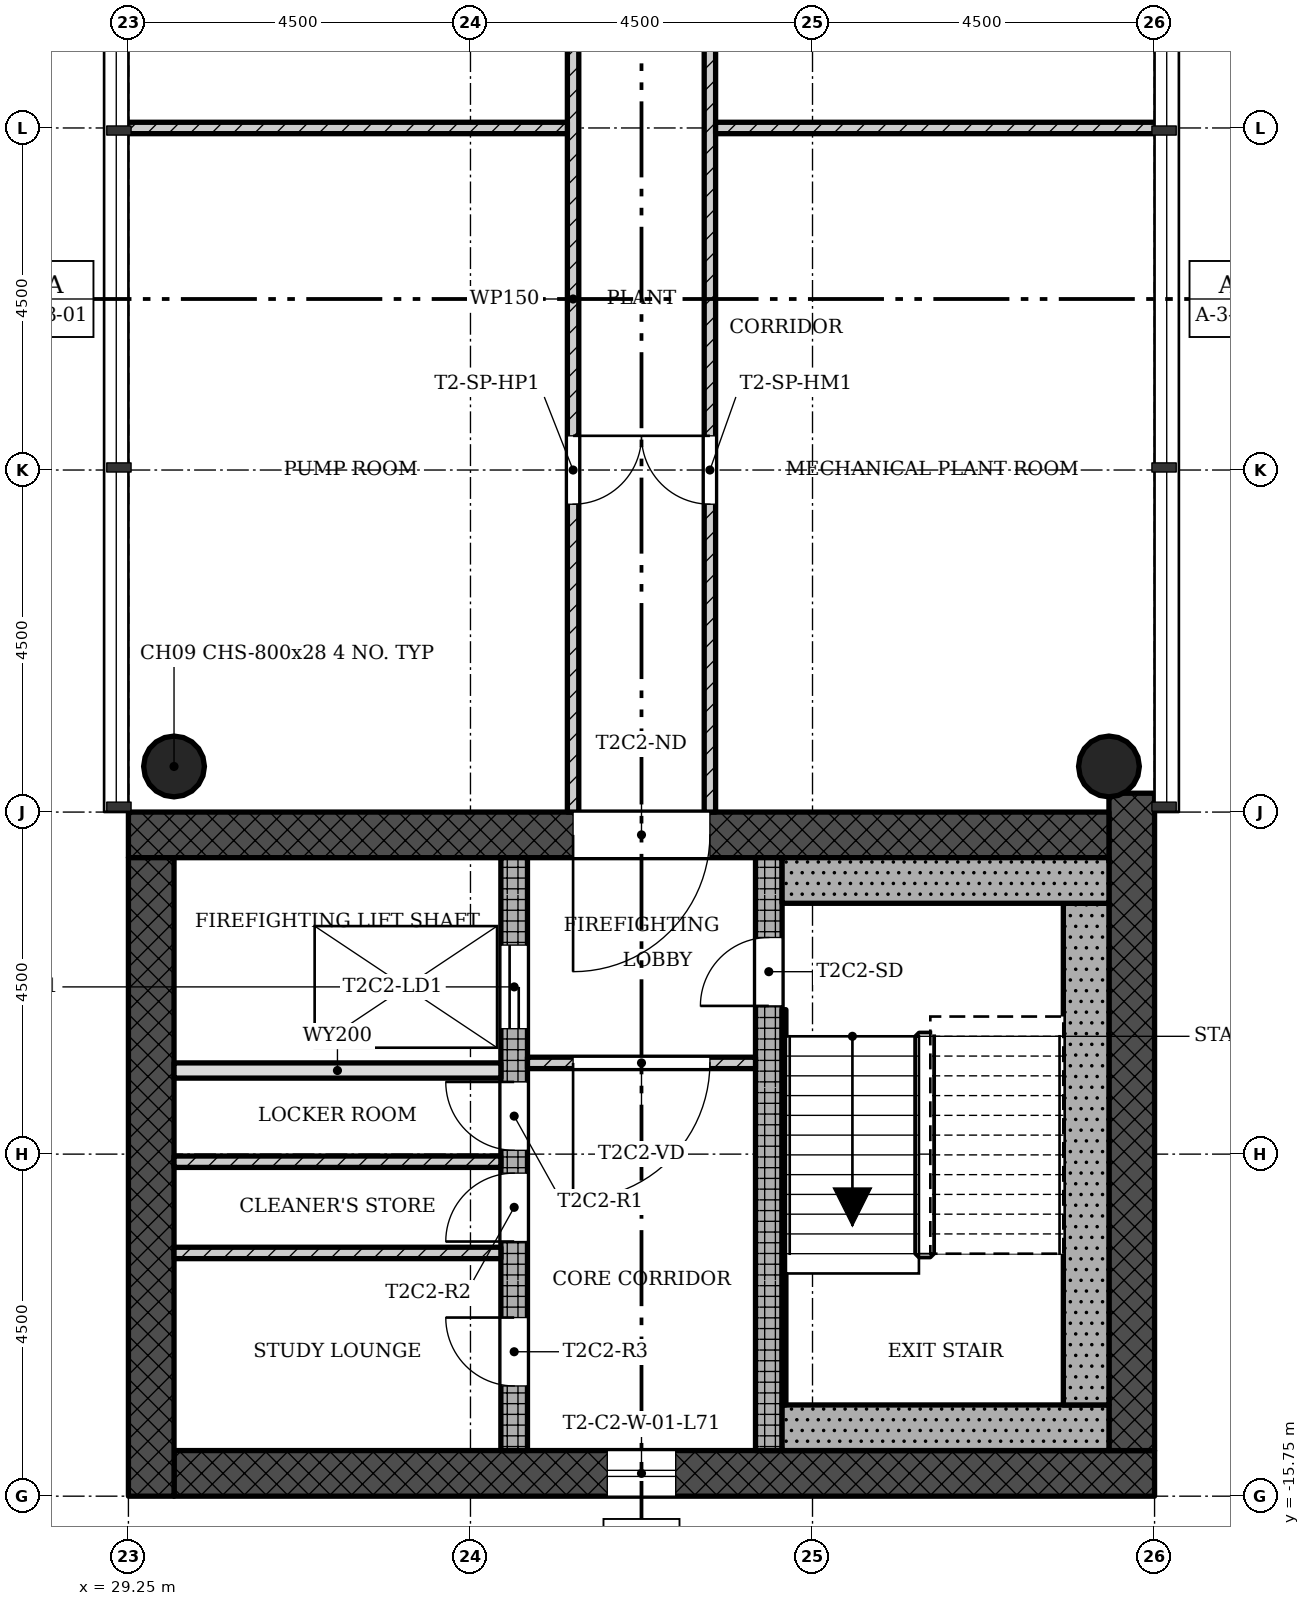
"""IFC4 building model, lengths in metres.
Left out: names, types, materials, properties, quantities, classifications, styles, units other than length and angle.
Written with IfcOpenShell. Run it as: python <this file> out.ifc"""

import sys

from ifc_helpers import new_model, si_unit, direction, frame, frame_2d, origin, origin_2d, place, context, subcontext, project, spatial, rectangle, hollow_circle, extrude, element, fill, save


model = new_model("IFC4")
c1 = context("Model", 3, precision=1e-05, world=origin(), true_north=direction((0.0, 1.0)))
c2 = subcontext(c1, "Body", "Model", "MODEL_VIEW")
j1 = project(units=[si_unit("LENGTHUNIT", "METRE"), si_unit("PLANEANGLEUNIT", "RADIAN")], contexts=[c1])
p1 = place(None, origin())
s1 = spatial("IfcSite", under=j1, at=p1, CompositionType="ELEMENT")
p2 = place(p1, origin())
s2 = spatial("IfcBuilding", under=s1, at=p2, CompositionType="ELEMENT")
p3 = place(p2, frame((0.0, 0.0, 260.4)))
s3 = spatial("IfcBuildingStorey", under=s2, at=p3, CompositionType="ELEMENT", Elevation=260.4)
p4 = place(p3, frame((29.85, -15.45, 0.0), z_axis=(0.0, 0.0, 1.0), x_axis=(1.0, 0.0, 0.0)))
e1 = element("IfcWall", 1, at=p4, inside=s3, PredefinedType="SHEAR", context=c2, shape_type="SweptSolid", body=[
    extrude(rectangle(XDim=12.9, YDim=0.6, at=frame_2d((6.45, 0.0))), origin(), (0.0, 0.0, 1.0), 4.5),
])
p5 = place(p4, frame((5.7, 0.0, 0.45)))
e2 = element("IfcOpeningElement", 2, at=p5, cuts=e1, PredefinedType="OPENING", context=c2, shape_type="SweptSolid", body=[
    extrude(rectangle(XDim=0.9, YDim=2.4, at=frame_2d((0.45, 1.2))), frame((0.0, 0.31, 0.0), z_axis=(0.0, -1.0, 0.0), x_axis=(1.0, 0.0, 0.0)), (0.0, 0.0, 1.0), 0.62),
])
p6 = place(p3, frame((42.45, -15.15, 0.0), z_axis=(0.0, 0.0, 1.0), x_axis=(0.0, 1.0, 0.0)))
e3 = element("IfcWall", 3, at=p6, inside=s3, PredefinedType="SHEAR", context=c2, shape_type="SweptSolid", body=[
    extrude(rectangle(XDim=8.648, YDim=0.6, at=frame_2d((4.324, 0.0))), origin(), (0.0, 0.0, 1.0), 4.5),
])
p7 = place(p3, frame((42.15, -7.05, 0.0), z_axis=(0.0, 0.0, 1.0), x_axis=(-1.0, 0.0, 0.0)))
e4 = element("IfcWall", 4, at=p7, inside=s3, PredefinedType="SHEAR", context=c2, shape_type="SweptSolid", body=[
    extrude(rectangle(XDim=12.9, YDim=0.6, at=frame_2d((6.45, 0.0))), origin(), (0.0, 0.0, 1.0), 4.5),
])
p8 = place(p7, frame((5.25, 0.0, 0.0)))
e5 = element("IfcOpeningElement", 5, at=p8, cuts=e4, PredefinedType="OPENING", context=c2, shape_type="SweptSolid", body=[
    extrude(rectangle(XDim=1.8, YDim=2.1, at=frame_2d((0.9, 1.05))), frame((0.0, 0.31, 0.0), z_axis=(0.0, -1.0, 0.0), x_axis=(1.0, 0.0, 0.0)), (0.0, 0.0, 1.0), 0.62),
])
p9 = place(p3, frame((29.55, -7.35, 0.0), z_axis=(0.0, 0.0, 1.0), x_axis=(0.0, -1.0, 0.0)))
e6 = element("IfcWall", 6, at=p9, inside=s3, PredefinedType="SHEAR", context=c2, shape_type="SweptSolid", body=[
    extrude(rectangle(XDim=8.4, YDim=0.6, at=frame_2d((4.2, 0.0))), origin(), (0.0, 0.0, 1.0), 4.5),
])
p10 = place(p3, frame((34.325, -15.15, 0.0), z_axis=(0.0, 0.0, 1.0), x_axis=(0.0, 1.0, 0.0)))
e7 = element("IfcWall", 7, at=p10, inside=s3, PredefinedType="SHEAR", context=c2, shape_type="SweptSolid", body=[
    extrude(rectangle(XDim=7.8, YDim=0.35, at=frame_2d((3.9, 0.0))), origin(), (0.0, 0.0, 1.0), 4.5),
])
p11 = place(p10, frame((5.55, 0.0, 0.0)))
e8 = element("IfcOpeningElement", 8, at=p11, cuts=e7, PredefinedType="OPENING", context=c2, shape_type="SweptSolid", body=[
    extrude(rectangle(XDim=1.1, YDim=2.1, at=frame_2d((0.55, 1.05))), frame((0.0, 0.185, 0.0), z_axis=(0.0, -1.0, 0.0), x_axis=(1.0, 0.0, 0.0)), (0.0, 0.0, 1.0), 0.37),
])
p12 = place(p10, frame((3.95, 0.0, 0.0)))
e9 = element("IfcOpeningElement", 9, at=p12, cuts=e7, PredefinedType="OPENING", context=c2, shape_type="SweptSolid", body=[
    extrude(rectangle(XDim=0.9, YDim=2.1, at=frame_2d((0.45, 1.05))), frame((0.0, 0.185, 0.0), z_axis=(0.0, -1.0, 0.0), x_axis=(1.0, 0.0, 0.0)), (0.0, 0.0, 1.0), 0.37),
])
p13 = place(p10, frame((2.75, 0.0, 0.0)))
e10 = element("IfcOpeningElement", 10, at=p13, cuts=e7, PredefinedType="OPENING", context=c2, shape_type="SweptSolid", body=[
    extrude(rectangle(XDim=0.9, YDim=2.1, at=frame_2d((0.45, 1.05))), frame((0.0, 0.185, 0.0), z_axis=(0.0, -1.0, 0.0), x_axis=(1.0, 0.0, 0.0)), (0.0, 0.0, 1.0), 0.37),
])
p14 = place(p10, frame((0.85, 0.0, 0.0)))
e11 = element("IfcOpeningElement", 11, at=p14, cuts=e7, PredefinedType="OPENING", context=c2, shape_type="SweptSolid", body=[
    extrude(rectangle(XDim=0.9, YDim=2.1, at=frame_2d((0.45, 1.05))), frame((0.0, 0.185, 0.0), z_axis=(0.0, -1.0, 0.0), x_axis=(1.0, 0.0, 0.0)), (0.0, 0.0, 1.0), 0.37),
])
p15 = place(p3, frame((37.675, -15.15, 0.0), z_axis=(0.0, 0.0, 1.0), x_axis=(0.0, 1.0, 0.0)))
e12 = element("IfcWall", 12, at=p15, inside=s3, PredefinedType="SHEAR", context=c2, shape_type="SweptSolid", body=[
    extrude(rectangle(XDim=7.8, YDim=0.35, at=frame_2d((3.9, 0.0))), origin(), (0.0, 0.0, 1.0), 4.5),
])
p16 = place(p15, frame((5.85, 0.0, 0.0)))
e13 = element("IfcOpeningElement", 13, at=p16, cuts=e12, PredefinedType="OPENING", context=c2, shape_type="SweptSolid", body=[
    extrude(rectangle(XDim=0.9, YDim=2.1, at=frame_2d((0.45, 1.05))), frame((0.0, 0.185, 0.0), z_axis=(0.0, -1.0, 0.0), x_axis=(1.0, 0.0, 0.0)), (0.0, 0.0, 1.0), 0.37),
])
for number, where, z_axis, x_axis in (
    (14, (42.15, -6.15, 0.0), (0.0, 0.0, 1.0), (1.0, 0.0, 0.0)),
    (15, (29.85, -6.15, 0.0), (0.0, 0.0, 1.0), (1.0, 0.0, 0.0)),
):
    element("IfcColumn", number, at=place(p3, frame(where, z_axis=z_axis, x_axis=x_axis)), inside=s3, PredefinedType="COLUMN", context=c2, shape_type="SweptSolid", body=[
        extrude(hollow_circle(Radius=0.4, WallThickness=0.028, at=origin_2d()), origin(), (0.0, 0.0, 1.0), 4.5),
    ])
p17 = place(p3, frame((34.5, -10.05, 0.0), z_axis=(0.0, 0.0, 1.0), x_axis=(1.0, 0.0, 0.0)))
e16 = element("IfcWall", 16, at=p17, inside=s3, PredefinedType="PARTITIONING", context=c2, shape_type="SweptSolid", body=[
    extrude(rectangle(XDim=3.0, YDim=0.15, at=frame_2d((1.5, 0.0))), origin(), (0.0, 0.0, 1.0), 4.09),
])
p18 = place(p17, frame((0.6, 0.0, 0.0)))
e17 = element("IfcOpeningElement", 17, at=p18, cuts=e16, PredefinedType="OPENING", context=c2, shape_type="SweptSolid", body=[
    extrude(rectangle(XDim=1.8, YDim=2.1, at=frame_2d((0.9, 1.05))), frame((0.0, 0.085, 0.0), z_axis=(0.0, -1.0, 0.0), x_axis=(1.0, 0.0, 0.0)), (0.0, 0.0, 1.0), 0.17),
])
p19 = place(p3, frame((29.85, -10.15, 0.0), z_axis=(0.0, 0.0, 1.0), x_axis=(1.0, 0.0, 0.0)))
e18 = element("IfcWall", 18, at=p19, inside=s3, PredefinedType="SOLIDWALL", context=c2, shape_type="SweptSolid", body=[
    extrude(rectangle(XDim=4.3, YDim=0.2, at=frame_2d((2.15, 0.0))), origin(), (0.0, 0.0, 1.0), 4.09),
])
for number, where, z_axis, x_axis in (
    (19, (29.85, -11.35, 0.0), (0.0, 0.0, 1.0), (1.0, 0.0, 0.0)),
    (20, (29.85, -12.55, 0.0), (0.0, 0.0, 1.0), (1.0, 0.0, 0.0)),
):
    element("IfcWall", number, at=place(p3, frame(where, z_axis=z_axis, x_axis=x_axis)), inside=s3, PredefinedType="PARTITIONING", context=c2, shape_type="SweptSolid", body=[
        extrude(rectangle(XDim=4.3, YDim=0.15, at=frame_2d((2.15, 0.0))), origin(), (0.0, 0.0, 1.0), 4.09),
    ])
p20 = place(p3, frame((35.1, -6.75, 0.0), z_axis=(0.0, 0.0, 1.0), x_axis=(0.0, 1.0, 0.0)))
e21 = element("IfcWall", 21, at=p20, inside=s3, PredefinedType="PARTITIONING", context=c2, shape_type="SweptSolid", body=[
    extrude(rectangle(XDim=13.5, YDim=0.15, at=frame_2d((6.75, 0.0))), origin(), (0.0, 0.0, 1.0), 4.09),
])
p21 = place(p20, frame((4.05, 0.0, 0.0)))
e22 = element("IfcOpeningElement", 22, at=p21, cuts=e21, PredefinedType="OPENING", context=c2, shape_type="SweptSolid", body=[
    extrude(rectangle(XDim=0.9, YDim=2.1, at=frame_2d((0.45, 1.05))), frame((0.0, 0.085, 0.0), z_axis=(0.0, -1.0, 0.0), x_axis=(1.0, 0.0, 0.0)), (0.0, 0.0, 1.0), 0.17),
])
p22 = place(p20, frame((10.8, 0.0, 0.0)))
e23 = element("IfcOpeningElement", 23, at=p22, cuts=e21, PredefinedType="OPENING", context=c2, shape_type="SweptSolid", body=[
    extrude(rectangle(XDim=0.9, YDim=2.1, at=frame_2d((0.45, 1.05))), frame((0.0, 0.085, 0.0), z_axis=(0.0, -1.0, 0.0), x_axis=(1.0, 0.0, 0.0)), (0.0, 0.0, 1.0), 0.17),
])
p23 = place(p3, frame((35.025, 2.25, 0.0), z_axis=(0.0, 0.0, 1.0), x_axis=(-1.0, 0.0, 0.0)))
e24 = element("IfcWall", 24, at=p23, inside=s3, PredefinedType="PARTITIONING", context=c2, shape_type="SweptSolid", body=[
    extrude(rectangle(XDim=5.875, YDim=0.15, at=frame_2d((2.938, 0.0))), origin(), (0.0, 0.0, 1.0), 4.09),
])
p24 = place(p3, frame((36.9, -6.75, 0.0), z_axis=(0.0, 0.0, 1.0), x_axis=(0.0, 1.0, 0.0)))
e25 = element("IfcWall", 25, at=p24, inside=s3, PredefinedType="PARTITIONING", context=c2, shape_type="SweptSolid", body=[
    extrude(rectangle(XDim=13.5, YDim=0.15, at=frame_2d((6.75, 0.0))), origin(), (0.0, 0.0, 1.0), 4.09),
])
p25 = place(p24, frame((4.05, 0.0, 0.0)))
e26 = element("IfcOpeningElement", 26, at=p25, cuts=e25, PredefinedType="OPENING", context=c2, shape_type="SweptSolid", body=[
    extrude(rectangle(XDim=0.9, YDim=2.1, at=frame_2d((0.45, 1.05))), frame((0.0, 0.085, 0.0), z_axis=(0.0, -1.0, 0.0), x_axis=(1.0, 0.0, 0.0)), (0.0, 0.0, 1.0), 0.17),
])
p26 = place(p24, frame((10.8, 0.0, 0.0)))
e27 = element("IfcOpeningElement", 27, at=p26, cuts=e25, PredefinedType="OPENING", context=c2, shape_type="SweptSolid", body=[
    extrude(rectangle(XDim=0.9, YDim=2.1, at=frame_2d((0.45, 1.05))), frame((0.0, 0.085, 0.0), z_axis=(0.0, -1.0, 0.0), x_axis=(1.0, 0.0, 0.0)), (0.0, 0.0, 1.0), 0.17),
])
p27 = place(p3, frame((36.975, 2.25, 0.0), z_axis=(0.0, 0.0, 1.0), x_axis=(1.0, 0.0, 0.0)))
e28 = element("IfcWall", 28, at=p27, inside=s3, PredefinedType="PARTITIONING", context=c2, shape_type="SweptSolid", body=[
    extrude(rectangle(XDim=5.875, YDim=0.15, at=frame_2d((2.938, 0.0))), origin(), (0.0, 0.0, 1.0), 4.09),
])
p28 = place(p3, frame((37.85, -14.85, 0.0), z_axis=(0.0, 0.0, 1.0), x_axis=(1.0, 0.0, 0.0)))
e29 = element("IfcWall", 29, at=p28, inside=s3, PredefinedType="SHEAR", context=c2, shape_type="SweptSolid", body=[
    extrude(rectangle(XDim=4.3, YDim=0.6, at=frame_2d((2.15, 0.0))), origin(), (0.0, 0.0, 1.0), 4.5),
])
p29 = place(p3, frame((41.85, -7.95, 0.0), z_axis=(0.0, 0.0, 1.0), x_axis=(0.0, -1.0, 0.0)))
e30 = element("IfcWall", 30, at=p29, inside=s3, PredefinedType="SHEAR", context=c2, shape_type="SweptSolid", body=[
    extrude(rectangle(XDim=6.6, YDim=0.6, at=frame_2d((3.3, 0.0))), origin(), (0.0, 0.0, 1.0), 4.5),
])
p30 = place(p3, frame((37.85, -7.65, 0.0), z_axis=(0.0, 0.0, 1.0), x_axis=(1.0, 0.0, 0.0)))
e31 = element("IfcWall", 31, at=p30, inside=s3, PredefinedType="SHEAR", context=c2, shape_type="SweptSolid", body=[
    extrude(rectangle(XDim=4.3, YDim=0.6, at=frame_2d((2.15, 0.0))), origin(), (0.0, 0.0, 1.0), 4.5),
])
p31 = place(p3, frame((37.875, -9.35, 0.0), z_axis=(0.0, 0.0, 1.0), x_axis=(0.0, -1.0, 0.0)))
e32 = element("IfcWall", 32, at=p31, inside=s3, PredefinedType="SHEAR", context=c2, shape_type="SweptSolid", body=[
    extrude(rectangle(XDim=5.2, YDim=0.05, at=frame_2d((2.6, 0.0))), origin(), (0.0, 0.0, 1.0), 4.5),
])
p32 = place(p5, origin())
e33 = element("IfcWindow", 33, at=p32, inside=s3, PartitioningType="SINGLE_PANEL", PredefinedType="WINDOW", context=c2, shape_type="SweptSolid", body=[
    extrude(rectangle(XDim=0.9, YDim=2.4, at=frame_2d((0.45, 1.2))), frame((0.0, 0.03, 0.0), z_axis=(0.0, -1.0, 0.0), x_axis=(1.0, 0.0, 0.0)), (0.0, 0.0, 1.0), 0.06),
])
fill(e2, e33)
p33 = place(p18, origin())
e34 = element("IfcDoor", 34, at=p33, inside=s3, OperationType="SINGLE_SWING_LEFT", PredefinedType="DOOR", context=c2, shape_type="SweptSolid", body=[
    extrude(rectangle(XDim=1.8, YDim=2.1, at=frame_2d((0.9, 1.05))), frame((0.0, 0.025, 0.0), z_axis=(0.0, -1.0, 0.0), x_axis=(1.0, 0.0, 0.0)), (0.0, 0.0, 1.0), 0.05),
])
fill(e17, e34)
p34 = place(p21, origin())
e35 = element("IfcDoor", 35, at=p34, inside=s3, OperationType="SINGLE_SWING_RIGHT", PredefinedType="DOOR", context=c2, shape_type="SweptSolid", body=[
    extrude(rectangle(XDim=0.9, YDim=2.1, at=frame_2d((0.45, 1.05))), frame((0.0, 0.025, 0.0), z_axis=(0.0, -1.0, 0.0), x_axis=(1.0, 0.0, 0.0)), (0.0, 0.0, 1.0), 0.05),
])
fill(e22, e35)
p35 = place(p25, origin())
e36 = element("IfcDoor", 36, at=p35, inside=s3, OperationType="SINGLE_SWING_LEFT", PredefinedType="DOOR", context=c2, shape_type="SweptSolid", body=[
    extrude(rectangle(XDim=0.9, YDim=2.1, at=frame_2d((0.45, 1.05))), frame((0.0, 0.025, 0.0), z_axis=(0.0, -1.0, 0.0), x_axis=(1.0, 0.0, 0.0)), (0.0, 0.0, 1.0), 0.05),
])
fill(e26, e36)
p36 = place(p16, origin())
e37 = element("IfcDoor", 37, at=p36, inside=s3, OperationType="SINGLE_SWING_RIGHT", PredefinedType="DOOR", context=c2, shape_type="SweptSolid", body=[
    extrude(rectangle(XDim=0.9, YDim=2.1, at=frame_2d((0.45, 1.05))), frame((0.0, 0.025, 0.0), z_axis=(0.0, -1.0, 0.0), x_axis=(1.0, 0.0, 0.0)), (0.0, 0.0, 1.0), 0.05),
])
fill(e13, e37)
p37 = place(p11, origin())
e38 = element("IfcDoor", 38, at=p37, inside=s3, OperationType="SLIDING_TO_LEFT", PredefinedType="DOOR", context=c2, shape_type="SweptSolid", body=[
    extrude(rectangle(XDim=1.1, YDim=2.1, at=frame_2d((0.55, 1.05))), frame((0.0, 0.025, 0.0), z_axis=(0.0, -1.0, 0.0), x_axis=(1.0, 0.0, 0.0)), (0.0, 0.0, 1.0), 0.05),
])
fill(e8, e38)
p38 = place(p12, origin())
e39 = element("IfcDoor", 39, at=p38, inside=s3, OperationType="SINGLE_SWING_LEFT", PredefinedType="DOOR", context=c2, shape_type="SweptSolid", body=[
    extrude(rectangle(XDim=0.9, YDim=2.1, at=frame_2d((0.45, 1.05))), frame((0.0, 0.025, 0.0), z_axis=(0.0, -1.0, 0.0), x_axis=(1.0, 0.0, 0.0)), (0.0, 0.0, 1.0), 0.05),
])
fill(e9, e39)
p39 = place(p13, origin())
e40 = element("IfcDoor", 40, at=p39, inside=s3, OperationType="SINGLE_SWING_RIGHT", PredefinedType="DOOR", context=c2, shape_type="SweptSolid", body=[
    extrude(rectangle(XDim=0.9, YDim=2.1, at=frame_2d((0.45, 1.05))), frame((0.0, 0.025, 0.0), z_axis=(0.0, -1.0, 0.0), x_axis=(1.0, 0.0, 0.0)), (0.0, 0.0, 1.0), 0.05),
])
fill(e10, e40)
p40 = place(p14, origin())
e41 = element("IfcDoor", 41, at=p40, inside=s3, OperationType="SINGLE_SWING_LEFT", PredefinedType="DOOR", context=c2, shape_type="SweptSolid", body=[
    extrude(rectangle(XDim=0.9, YDim=2.1, at=frame_2d((0.45, 1.05))), frame((0.0, 0.025, 0.0), z_axis=(0.0, -1.0, 0.0), x_axis=(1.0, 0.0, 0.0)), (0.0, 0.0, 1.0), 0.05),
])
fill(e11, e41)
p41 = place(p8, origin())
e42 = element("IfcDoor", 42, at=p41, inside=s3, OperationType="SINGLE_SWING_LEFT", PredefinedType="DOOR", context=c2, shape_type="SweptSolid", body=[
    extrude(rectangle(XDim=1.8, YDim=2.1, at=frame_2d((0.9, 1.05))), frame((0.0, 0.025, 0.0), z_axis=(0.0, -1.0, 0.0), x_axis=(1.0, 0.0, 0.0)), (0.0, 0.0, 1.0), 0.05),
])
fill(e5, e42)
save(model, sys.argv[1])
